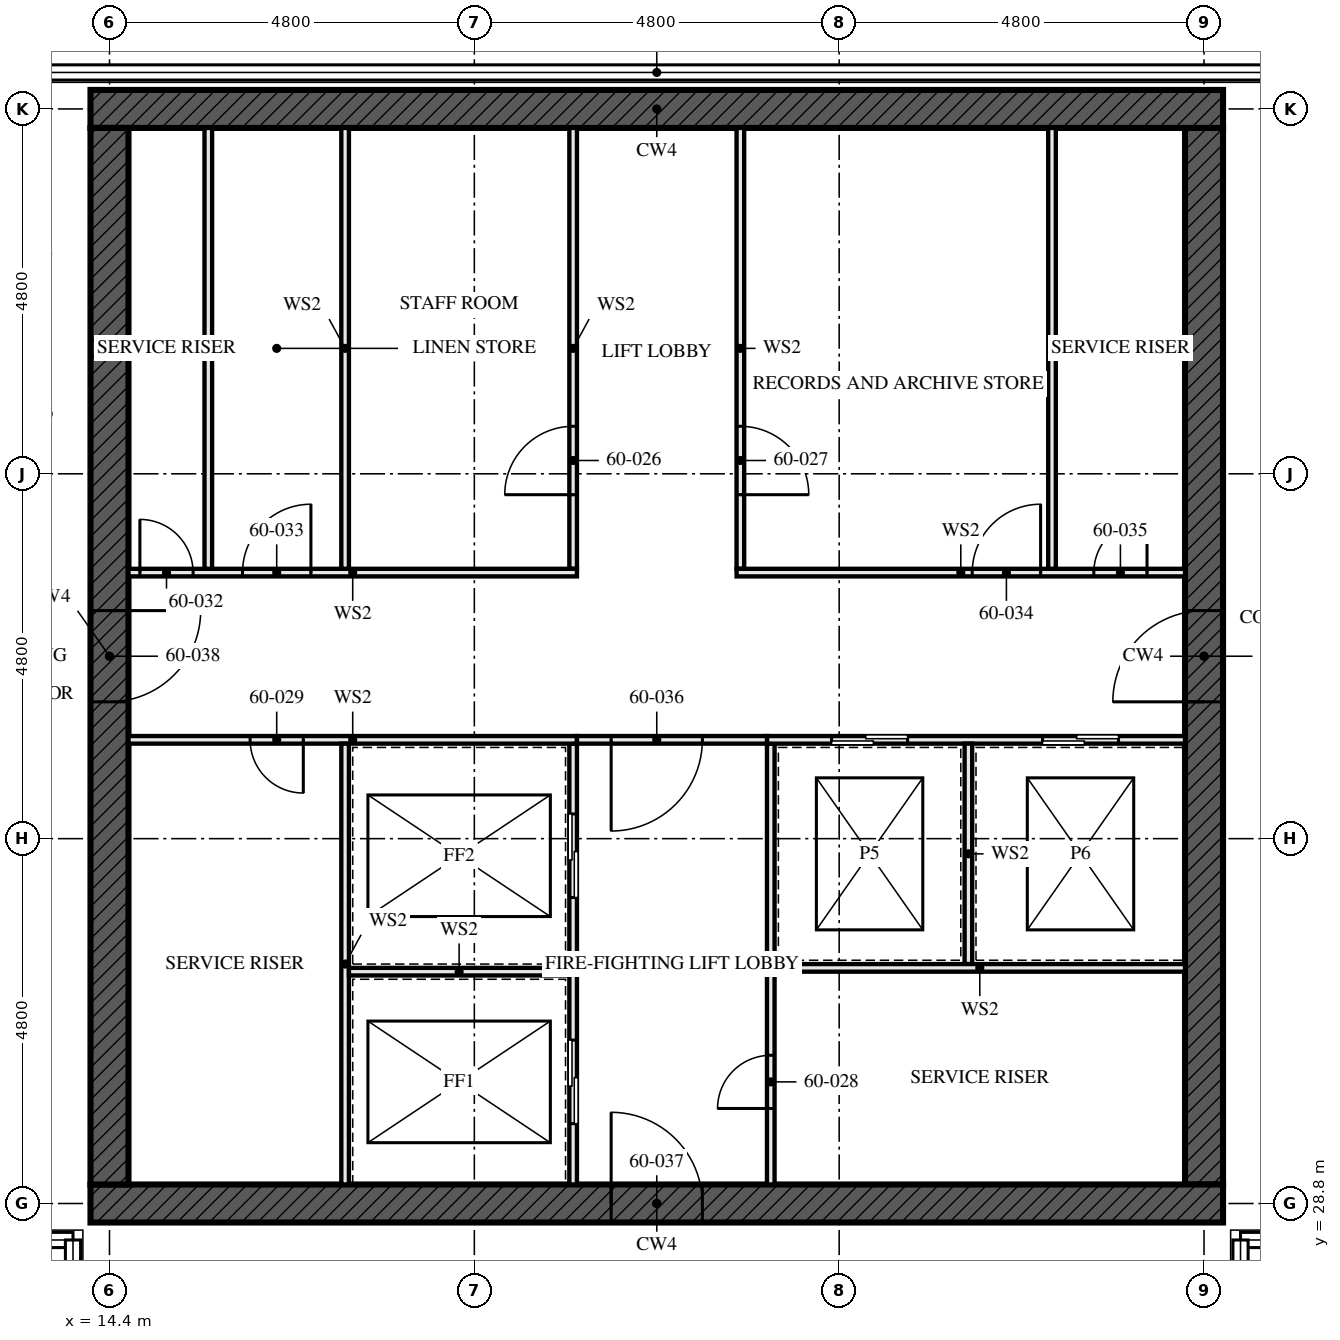
"""IFC4 building model, lengths in metres.
Left out: names, types, materials, properties, quantities, classifications, styles, units other than length and angle.
Written with IfcOpenShell. Run it as: python <this file> out.ifc"""

import sys

from ifc_helpers import new_model, si_unit, direction, frame, frame_2d, origin, place, context, subcontext, project, spatial, rectangle, extrude, element, fill, save


model = new_model("IFC4")
c1 = context("Model", 3, precision=1e-05, world=origin(), true_north=direction((0.0, 1.0)))
c2 = subcontext(c1, "Body", "Model", "MODEL_VIEW")
j1 = project(units=[si_unit("LENGTHUNIT", "METRE"), si_unit("PLANEANGLEUNIT", "RADIAN")], contexts=[c1])
p1 = place(None, origin())
s1 = spatial("IfcSite", under=j1, at=p1, CompositionType="ELEMENT")
p2 = place(p1, origin())
s2 = spatial("IfcBuilding", under=s1, at=p2, CompositionType="ELEMENT")
p3 = place(p2, frame((0.0, 0.0, 219.0)))
s3 = spatial("IfcBuildingStorey", under=s2, at=p3, CompositionType="ELEMENT", Elevation=219.0)
p4 = place(p3, frame((14.15, 28.8, -0.17), z_axis=(0.0, 0.0, 1.0), x_axis=(1.0, 0.0, 0.0)))
e1 = element("IfcWall", 1, at=p4, inside=s3, PredefinedType="SHEAR", context=c2, shape_type="SweptSolid", body=[
    extrude(rectangle(XDim=14.9, YDim=0.5, at=frame_2d((7.45, 0.0))), origin(), (0.0, 0.0, 1.0), 3.5),
])
p5 = place(p4, frame((6.85, 0.0, 0.17)))
e2 = element("IfcOpeningElement", 2, at=p5, cuts=e1, PredefinedType="OPENING", context=c2, shape_type="SweptSolid", body=[
    extrude(rectangle(XDim=1.2, YDim=2.1, at=frame_2d((0.6, 1.05))), frame((0.0, 0.26, 0.0), z_axis=(0.0, -1.0, 0.0), x_axis=(1.0, 0.0, 0.0)), (0.0, 0.0, 1.0), 0.521),
])
p6 = place(p3, frame((29.05, 43.2, -0.17), z_axis=(0.0, 0.0, 1.0), x_axis=(-1.0, 0.0, 0.0)))
e3 = element("IfcWall", 3, at=p6, inside=s3, PredefinedType="SHEAR", context=c2, shape_type="SweptSolid", body=[
    extrude(rectangle(XDim=14.9, YDim=0.5, at=frame_2d((7.45, 0.0))), origin(), (0.0, 0.0, 1.0), 3.5),
])
p7 = place(p3, frame((14.4, 42.95, -0.17), z_axis=(0.0, 0.0, 1.0), x_axis=(0.0, -1.0, 0.0)))
e4 = element("IfcWall", 4, at=p7, inside=s3, PredefinedType="SHEAR", context=c2, shape_type="SweptSolid", body=[
    extrude(rectangle(XDim=13.9, YDim=0.5, at=frame_2d((6.95, 0.0))), origin(), (0.0, 0.0, 1.0), 3.5),
])
p8 = place(p7, frame((6.35, 0.0, 0.17)))
e5 = element("IfcOpeningElement", 5, at=p8, cuts=e4, PredefinedType="OPENING", context=c2, shape_type="SweptSolid", body=[
    extrude(rectangle(XDim=1.2, YDim=2.1, at=frame_2d((0.6, 1.05))), frame((0.0, 0.26, 0.0), z_axis=(0.0, -1.0, 0.0), x_axis=(1.0, 0.0, 0.0)), (0.0, 0.0, 1.0), 0.521),
])
p9 = place(p3, frame((28.8, 29.05, -0.17), z_axis=(0.0, 0.0, 1.0), x_axis=(0.0, 1.0, 0.0)))
e6 = element("IfcWall", 6, at=p9, inside=s3, PredefinedType="SHEAR", context=c2, shape_type="SweptSolid", body=[
    extrude(rectangle(XDim=13.9, YDim=0.5, at=frame_2d((6.95, 0.0))), origin(), (0.0, 0.0, 1.0), 3.5),
])
p10 = place(p9, frame((6.35, 0.0, 0.17)))
e7 = element("IfcOpeningElement", 7, at=p10, cuts=e6, PredefinedType="OPENING", context=c2, shape_type="SweptSolid", body=[
    extrude(rectangle(XDim=1.2, YDim=2.1, at=frame_2d((0.6, 1.05))), frame((0.0, 0.26, 0.0), z_axis=(0.0, -1.0, 0.0), x_axis=(1.0, 0.0, 0.0)), (0.0, 0.0, 1.0), 0.521),
])
for number, where, z_axis, x_axis in (
    (8, (15.7, 37.15, 0.0), (0.0, 0.0, 1.0), (0.0, 1.0, 0.0)),
    (9, (26.8, 37.15, 0.0), (0.0, 0.0, 1.0), (0.0, 1.0, 0.0)),
):
    element("IfcWall", number, at=place(p3, frame(where, z_axis=z_axis, x_axis=x_axis)), inside=s3, PredefinedType="SOLIDWALL", context=c2, shape_type="SweptSolid", body=[
        extrude(rectangle(XDim=5.8, YDim=0.1, at=frame_2d((2.9, 0.0))), origin(), (0.0, 0.0, 1.0), 3.33),
    ])
p11 = place(p3, frame((20.5, 29.05, 0.0), z_axis=(0.0, 0.0, 1.0), x_axis=(0.0, 1.0, 0.0)))
e10 = element("IfcWall", 10, at=p11, inside=s3, PredefinedType="SOLIDWALL", context=c2, shape_type="SweptSolid", body=[
    extrude(rectangle(XDim=5.8, YDim=0.1, at=frame_2d((2.9, 0.0))), origin(), (0.0, 0.0, 1.0), 3.33),
])
p12 = place(p11, frame((0.8, 0.0, 0.0)))
e11 = element("IfcOpeningElement", 11, at=p12, cuts=e10, PredefinedType="OPENING", context=c2, shape_type="SweptSolid", body=[
    extrude(rectangle(XDim=1.1, YDim=2.3, at=frame_2d((0.55, 1.15))), frame((0.0, 0.061, 0.0), z_axis=(0.0, -1.0, 0.0), x_axis=(1.0, 0.0, 0.0)), (0.0, 0.0, 1.0), 0.121),
])
p13 = place(p11, frame((3.775, 0.0, 0.0)))
e12 = element("IfcOpeningElement", 12, at=p13, cuts=e10, PredefinedType="OPENING", context=c2, shape_type="SweptSolid", body=[
    extrude(rectangle(XDim=1.1, YDim=2.3, at=frame_2d((0.55, 1.15))), frame((0.0, 0.061, 0.0), z_axis=(0.0, -1.0, 0.0), x_axis=(1.0, 0.0, 0.0)), (0.0, 0.0, 1.0), 0.121),
])
p14 = place(p3, frame((20.5, 37.15, 0.0), z_axis=(0.0, 0.0, 1.0), x_axis=(0.0, 1.0, 0.0)))
e13 = element("IfcWall", 13, at=p14, inside=s3, PredefinedType="SOLIDWALL", context=c2, shape_type="SweptSolid", body=[
    extrude(rectangle(XDim=5.8, YDim=0.1, at=frame_2d((2.9, 0.0))), origin(), (0.0, 0.0, 1.0), 3.33),
])
p15 = place(p14, frame((0.975, 0.0, 0.0)))
e14 = element("IfcOpeningElement", 14, at=p15, cuts=e13, PredefinedType="OPENING", context=c2, shape_type="SweptSolid", body=[
    extrude(rectangle(XDim=0.9, YDim=2.1, at=frame_2d((0.45, 1.05))), frame((0.0, 0.061, 0.0), z_axis=(0.0, -1.0, 0.0), x_axis=(1.0, 0.0, 0.0)), (0.0, 0.0, 1.0), 0.121),
])
p16 = place(p3, frame((22.7, 37.15, 0.0), z_axis=(0.0, 0.0, 1.0), x_axis=(0.0, 1.0, 0.0)))
e15 = element("IfcWall", 15, at=p16, inside=s3, PredefinedType="SOLIDWALL", context=c2, shape_type="SweptSolid", body=[
    extrude(rectangle(XDim=5.8, YDim=0.1, at=frame_2d((2.9, 0.0))), origin(), (0.0, 0.0, 1.0), 3.33),
])
p17 = place(p16, frame((0.975, 0.0, 0.0)))
e16 = element("IfcOpeningElement", 16, at=p17, cuts=e15, PredefinedType="OPENING", context=c2, shape_type="SweptSolid", body=[
    extrude(rectangle(XDim=0.9, YDim=2.1, at=frame_2d((0.45, 1.05))), frame((0.0, 0.061, 0.0), z_axis=(0.0, -1.0, 0.0), x_axis=(1.0, 0.0, 0.0)), (0.0, 0.0, 1.0), 0.121),
])
p18 = place(p3, frame((23.1, 29.05, 0.0), z_axis=(0.0, 0.0, 1.0), x_axis=(0.0, 1.0, 0.0)))
e17 = element("IfcWall", 17, at=p18, inside=s3, PredefinedType="SOLIDWALL", context=c2, shape_type="SweptSolid", body=[
    extrude(rectangle(XDim=5.8, YDim=0.1, at=frame_2d((2.9, 0.0))), origin(), (0.0, 0.0, 1.0), 3.33),
])
p19 = place(p18, frame((1.0, 0.0, 0.0)))
e18 = element("IfcOpeningElement", 18, at=p19, cuts=e17, PredefinedType="OPENING", context=c2, shape_type="SweptSolid", body=[
    extrude(rectangle(XDim=0.7, YDim=2.1, at=frame_2d((0.35, 1.05))), frame((0.0, 0.061, 0.0), z_axis=(0.0, -1.0, 0.0), x_axis=(1.0, 0.0, 0.0)), (0.0, 0.0, 1.0), 0.121),
])
p20 = place(p3, frame((14.65, 34.9, 0.0), z_axis=(0.0, 0.0, 1.0), x_axis=(1.0, 0.0, 0.0)))
e19 = element("IfcWall", 19, at=p20, inside=s3, PredefinedType="SOLIDWALL", context=c2, shape_type="SweptSolid", body=[
    extrude(rectangle(XDim=5.9, YDim=0.1, at=frame_2d((2.95, 0.0))), origin(), (0.0, 0.0, 1.0), 3.33),
])
p21 = place(p20, frame((1.6, 0.0, 0.0)))
e20 = element("IfcOpeningElement", 20, at=p21, cuts=e19, PredefinedType="OPENING", context=c2, shape_type="SweptSolid", body=[
    extrude(rectangle(XDim=0.7, YDim=2.1, at=frame_2d((0.35, 1.05))), frame((0.0, 0.061, 0.0), z_axis=(0.0, -1.0, 0.0), x_axis=(1.0, 0.0, 0.0)), (0.0, 0.0, 1.0), 0.121),
])
p22 = place(p3, frame((23.05, 34.9, 0.0), z_axis=(0.0, 0.0, 1.0), x_axis=(1.0, 0.0, 0.0)))
e21 = element("IfcWall", 21, at=p22, inside=s3, PredefinedType="SOLIDWALL", context=c2, shape_type="SweptSolid", body=[
    extrude(rectangle(XDim=5.5, YDim=0.1, at=frame_2d((2.75, 0.0))), origin(), (0.0, 0.0, 1.0), 3.33),
])
p23 = place(p22, frame((0.85, 0.0, 0.0)))
e22 = element("IfcOpeningElement", 22, at=p23, cuts=e21, PredefinedType="OPENING", context=c2, shape_type="SweptSolid", body=[
    extrude(rectangle(XDim=1.0, YDim=2.1, at=frame_2d((0.5, 1.05))), frame((0.0, 0.061, 0.0), z_axis=(0.0, -1.0, 0.0), x_axis=(1.0, 0.0, 0.0)), (0.0, 0.0, 1.0), 0.121),
])
p24 = place(p22, frame((3.625, 0.0, 0.0)))
e23 = element("IfcOpeningElement", 23, at=p24, cuts=e21, PredefinedType="OPENING", context=c2, shape_type="SweptSolid", body=[
    extrude(rectangle(XDim=1.0, YDim=2.1, at=frame_2d((0.5, 1.05))), frame((0.0, 0.061, 0.0), z_axis=(0.0, -1.0, 0.0), x_axis=(1.0, 0.0, 0.0)), (0.0, 0.0, 1.0), 0.121),
])
p25 = place(p3, frame((14.65, 37.1, 0.0), z_axis=(0.0, 0.0, 1.0), x_axis=(1.0, 0.0, 0.0)))
e24 = element("IfcWall", 24, at=p25, inside=s3, PredefinedType="SOLIDWALL", context=c2, shape_type="SweptSolid", body=[
    extrude(rectangle(XDim=5.9, YDim=0.1, at=frame_2d((2.95, 0.0))), origin(), (0.0, 0.0, 1.0), 3.33),
])
p26 = place(p25, frame((0.15, 0.0, 0.0)))
e25 = element("IfcOpeningElement", 25, at=p26, cuts=e24, PredefinedType="OPENING", context=c2, shape_type="SweptSolid", body=[
    extrude(rectangle(XDim=0.7, YDim=2.1, at=frame_2d((0.35, 1.05))), frame((0.0, 0.061, 0.0), z_axis=(0.0, -1.0, 0.0), x_axis=(1.0, 0.0, 0.0)), (0.0, 0.0, 1.0), 0.121),
])
p27 = place(p25, frame((1.5, 0.0, 0.0)))
e26 = element("IfcOpeningElement", 26, at=p27, cuts=e24, PredefinedType="OPENING", context=c2, shape_type="SweptSolid", body=[
    extrude(rectangle(XDim=0.9, YDim=2.1, at=frame_2d((0.45, 1.05))), frame((0.0, 0.061, 0.0), z_axis=(0.0, -1.0, 0.0), x_axis=(1.0, 0.0, 0.0)), (0.0, 0.0, 1.0), 0.121),
])
p28 = place(p3, frame((22.65, 37.1, 0.0), z_axis=(0.0, 0.0, 1.0), x_axis=(1.0, 0.0, 0.0)))
e27 = element("IfcWall", 27, at=p28, inside=s3, PredefinedType="SOLIDWALL", context=c2, shape_type="SweptSolid", body=[
    extrude(rectangle(XDim=5.9, YDim=0.1, at=frame_2d((2.95, 0.0))), origin(), (0.0, 0.0, 1.0), 3.33),
])
p29 = place(p28, frame((3.1, 0.0, 0.0)))
e28 = element("IfcOpeningElement", 28, at=p29, cuts=e27, PredefinedType="OPENING", context=c2, shape_type="SweptSolid", body=[
    extrude(rectangle(XDim=0.9, YDim=2.1, at=frame_2d((0.45, 1.05))), frame((0.0, 0.061, 0.0), z_axis=(0.0, -1.0, 0.0), x_axis=(1.0, 0.0, 0.0)), (0.0, 0.0, 1.0), 0.121),
])
p30 = place(p28, frame((4.7, 0.0, 0.0)))
e29 = element("IfcOpeningElement", 29, at=p30, cuts=e27, PredefinedType="OPENING", context=c2, shape_type="SweptSolid", body=[
    extrude(rectangle(XDim=0.7, YDim=2.1, at=frame_2d((0.35, 1.05))), frame((0.0, 0.061, 0.0), z_axis=(0.0, -1.0, 0.0), x_axis=(1.0, 0.0, 0.0)), (0.0, 0.0, 1.0), 0.121),
])
p31 = place(p3, frame((20.55, 34.9, 0.0), z_axis=(0.0, 0.0, 1.0), x_axis=(1.0, 0.0, 0.0)))
e30 = element("IfcWall", 30, at=p31, inside=s3, PredefinedType="SOLIDWALL", context=c2, shape_type="SweptSolid", body=[
    extrude(rectangle(XDim=2.5, YDim=0.1, at=frame_2d((1.25, 0.0))), origin(), (0.0, 0.0, 1.0), 3.33),
])
p32 = place(p31, frame((0.45, 0.0, 0.0)))
e31 = element("IfcOpeningElement", 31, at=p32, cuts=e30, PredefinedType="OPENING", context=c2, shape_type="SweptSolid", body=[
    extrude(rectangle(XDim=1.2, YDim=2.1, at=frame_2d((0.6, 1.05))), frame((0.0, 0.061, 0.0), z_axis=(0.0, -1.0, 0.0), x_axis=(1.0, 0.0, 0.0)), (0.0, 0.0, 1.0), 0.121),
])
p33 = place(p3, frame((17.5, 29.05, 0.0), z_axis=(0.0, 0.0, 1.0), x_axis=(0.0, 1.0, 0.0)))
e32 = element("IfcWall", 32, at=p33, inside=s3, PredefinedType="SOLIDWALL", context=c2, shape_type="SweptSolid", body=[
    extrude(rectangle(XDim=5.8, YDim=0.1, at=frame_2d((2.9, 0.0))), origin(), (0.0, 0.0, 1.0), 3.33),
])
p34 = place(p3, frame((17.55, 31.85, 0.0), z_axis=(0.0, 0.0, 1.0), x_axis=(1.0, 0.0, 0.0)))
e33 = element("IfcWall", 33, at=p34, inside=s3, PredefinedType="SOLIDWALL", context=c2, shape_type="SweptSolid", body=[
    extrude(rectangle(XDim=2.9, YDim=0.1, at=frame_2d((1.45, 0.0))), origin(), (0.0, 0.0, 1.0), 3.33),
])
p35 = place(p3, frame((17.5, 37.15, 0.0), z_axis=(0.0, 0.0, 1.0), x_axis=(0.0, 1.0, 0.0)))
e34 = element("IfcWall", 34, at=p35, inside=s3, PredefinedType="SOLIDWALL", context=c2, shape_type="SweptSolid", body=[
    extrude(rectangle(XDim=5.8, YDim=0.1, at=frame_2d((2.9, 0.0))), origin(), (0.0, 0.0, 1.0), 3.33),
])
p36 = place(p3, frame((25.7, 31.95, 0.0), z_axis=(0.0, 0.0, 1.0), x_axis=(0.0, 1.0, 0.0)))
e35 = element("IfcWall", 35, at=p36, inside=s3, PredefinedType="SOLIDWALL", context=c2, shape_type="SweptSolid", body=[
    extrude(rectangle(XDim=2.9, YDim=0.1, at=frame_2d((1.45, 0.0))), origin(), (0.0, 0.0, 1.0), 3.33),
])
p37 = place(p3, frame((23.15, 31.9, 0.0), z_axis=(0.0, 0.0, 1.0), x_axis=(1.0, 0.0, 0.0)))
e36 = element("IfcWall", 36, at=p37, inside=s3, PredefinedType="SOLIDWALL", context=c2, shape_type="SweptSolid", body=[
    extrude(rectangle(XDim=5.4, YDim=0.1, at=frame_2d((2.7, 0.0))), origin(), (0.0, 0.0, 1.0), 3.33),
])
p38 = place(p12, origin())
e37 = element("IfcDoor", 37, at=p38, inside=s3, OperationType="SLIDING_TO_LEFT", PredefinedType="DOOR", context=c2, shape_type="SweptSolid", body=[
    extrude(rectangle(XDim=1.1, YDim=2.3, at=frame_2d((0.55, 1.15))), frame((0.0, 0.05, 0.0), z_axis=(0.0, -1.0, 0.0), x_axis=(1.0, 0.0, 0.0)), (0.0, 0.0, 1.0), 0.1),
])
fill(e11, e37)
p39 = place(p13, origin())
e38 = element("IfcDoor", 38, at=p39, inside=s3, OperationType="SLIDING_TO_LEFT", PredefinedType="DOOR", context=c2, shape_type="SweptSolid", body=[
    extrude(rectangle(XDim=1.1, YDim=2.3, at=frame_2d((0.55, 1.15))), frame((0.0, 0.05, 0.0), z_axis=(0.0, -1.0, 0.0), x_axis=(1.0, 0.0, 0.0)), (0.0, 0.0, 1.0), 0.1),
])
fill(e12, e38)
p40 = place(p15, origin())
e39 = element("IfcDoor", 39, at=p40, inside=s3, OperationType="SINGLE_SWING_RIGHT", PredefinedType="DOOR", context=c2, shape_type="SweptSolid", body=[
    extrude(rectangle(XDim=0.9, YDim=2.1, at=frame_2d((0.45, 1.05))), frame((0.0, 0.027, 0.0), z_axis=(0.0, -1.0, 0.0), x_axis=(1.0, 0.0, 0.0)), (0.0, 0.0, 1.0), 0.054),
])
fill(e14, e39)
p41 = place(p17, frame((0.9, 0.0, 0.0), z_axis=(0.0, 0.0, 1.0), x_axis=(-1.0, 0.0, 0.0)))
e40 = element("IfcDoor", 40, at=p41, inside=s3, OperationType="SINGLE_SWING_LEFT", PredefinedType="DOOR", context=c2, shape_type="SweptSolid", body=[
    extrude(rectangle(XDim=0.9, YDim=2.1, at=frame_2d((0.45, 1.05))), frame((0.0, 0.027, 0.0), z_axis=(0.0, -1.0, 0.0), x_axis=(1.0, 0.0, 0.0)), (0.0, 0.0, 1.0), 0.054),
])
fill(e16, e40)
p42 = place(p19, origin())
e41 = element("IfcDoor", 41, at=p42, inside=s3, OperationType="SINGLE_SWING_RIGHT", PredefinedType="DOOR", context=c2, shape_type="SweptSolid", body=[
    extrude(rectangle(XDim=0.7, YDim=2.1, at=frame_2d((0.35, 1.05))), frame((0.0, 0.027, 0.0), z_axis=(0.0, -1.0, 0.0), x_axis=(1.0, 0.0, 0.0)), (0.0, 0.0, 1.0), 0.054),
])
fill(e18, e41)
p43 = place(p21, frame((0.7, 0.0, 0.0), z_axis=(0.0, 0.0, 1.0), x_axis=(-1.0, 0.0, 0.0)))
e42 = element("IfcDoor", 42, at=p43, inside=s3, OperationType="SINGLE_SWING_RIGHT", PredefinedType="DOOR", context=c2, shape_type="SweptSolid", body=[
    extrude(rectangle(XDim=0.7, YDim=2.1, at=frame_2d((0.35, 1.05))), frame((0.0, 0.027, 0.0), z_axis=(0.0, -1.0, 0.0), x_axis=(1.0, 0.0, 0.0)), (0.0, 0.0, 1.0), 0.054),
])
fill(e20, e42)
p44 = place(p23, origin())
e43 = element("IfcDoor", 43, at=p44, inside=s3, OperationType="SLIDING_TO_LEFT", PredefinedType="DOOR", context=c2, shape_type="SweptSolid", body=[
    extrude(rectangle(XDim=1.0, YDim=2.1, at=frame_2d((0.5, 1.05))), frame((0.0, 0.05, 0.0), z_axis=(0.0, -1.0, 0.0), x_axis=(1.0, 0.0, 0.0)), (0.0, 0.0, 1.0), 0.1),
])
fill(e22, e43)
p45 = place(p24, origin())
e44 = element("IfcDoor", 44, at=p45, inside=s3, OperationType="SLIDING_TO_LEFT", PredefinedType="DOOR", context=c2, shape_type="SweptSolid", body=[
    extrude(rectangle(XDim=1.0, YDim=2.1, at=frame_2d((0.5, 1.05))), frame((0.0, 0.05, 0.0), z_axis=(0.0, -1.0, 0.0), x_axis=(1.0, 0.0, 0.0)), (0.0, 0.0, 1.0), 0.1),
])
fill(e23, e44)
p46 = place(p26, origin())
e45 = element("IfcDoor", 45, at=p46, inside=s3, OperationType="SINGLE_SWING_RIGHT", PredefinedType="DOOR", context=c2, shape_type="SweptSolid", body=[
    extrude(rectangle(XDim=0.7, YDim=2.1, at=frame_2d((0.35, 1.05))), frame((0.0, 0.027, 0.0), z_axis=(0.0, -1.0, 0.0), x_axis=(1.0, 0.0, 0.0)), (0.0, 0.0, 1.0), 0.054),
])
fill(e25, e45)
p47 = place(p27, origin())
e46 = element("IfcDoor", 46, at=p47, inside=s3, OperationType="SINGLE_SWING_LEFT", PredefinedType="DOOR", context=c2, shape_type="SweptSolid", body=[
    extrude(rectangle(XDim=0.9, YDim=2.1, at=frame_2d((0.45, 1.05))), frame((0.0, 0.027, 0.0), z_axis=(0.0, -1.0, 0.0), x_axis=(1.0, 0.0, 0.0)), (0.0, 0.0, 1.0), 0.054),
])
fill(e26, e46)
p48 = place(p29, origin())
e47 = element("IfcDoor", 47, at=p48, inside=s3, OperationType="SINGLE_SWING_LEFT", PredefinedType="DOOR", context=c2, shape_type="SweptSolid", body=[
    extrude(rectangle(XDim=0.9, YDim=2.1, at=frame_2d((0.45, 1.05))), frame((0.0, 0.027, 0.0), z_axis=(0.0, -1.0, 0.0), x_axis=(1.0, 0.0, 0.0)), (0.0, 0.0, 1.0), 0.054),
])
fill(e28, e47)
p49 = place(p30, origin())
e48 = element("IfcDoor", 48, at=p49, inside=s3, OperationType="SINGLE_SWING_LEFT", PredefinedType="DOOR", context=c2, shape_type="SweptSolid", body=[
    extrude(rectangle(XDim=0.7, YDim=2.1, at=frame_2d((0.35, 1.05))), frame((0.0, 0.027, 0.0), z_axis=(0.0, -1.0, 0.0), x_axis=(1.0, 0.0, 0.0)), (0.0, 0.0, 1.0), 0.054),
])
fill(e29, e48)
p50 = place(p32, frame((1.2, 0.0, 0.0), z_axis=(0.0, 0.0, 1.0), x_axis=(-1.0, 0.0, 0.0)))
e49 = element("IfcDoor", 49, at=p50, inside=s3, OperationType="SINGLE_SWING_LEFT", PredefinedType="DOOR", context=c2, shape_type="SweptSolid", body=[
    extrude(rectangle(XDim=1.2, YDim=2.1, at=frame_2d((0.6, 1.05))), frame((0.0, 0.027, 0.0), z_axis=(0.0, -1.0, 0.0), x_axis=(1.0, 0.0, 0.0)), (0.0, 0.0, 1.0), 0.054),
])
fill(e31, e49)
p51 = place(p5, origin())
e50 = element("IfcDoor", 50, at=p51, inside=s3, OperationType="SINGLE_SWING_LEFT", PredefinedType="DOOR", context=c2, shape_type="SweptSolid", body=[
    extrude(rectangle(XDim=1.2, YDim=2.1, at=frame_2d((0.6, 1.05))), frame((0.0, 0.027, 0.0), z_axis=(0.0, -1.0, 0.0), x_axis=(1.0, 0.0, 0.0)), (0.0, 0.0, 1.0), 0.054),
])
fill(e2, e50)
p52 = place(p8, origin())
e51 = element("IfcDoor", 51, at=p52, inside=s3, OperationType="SINGLE_SWING_LEFT", PredefinedType="DOOR", context=c2, shape_type="SweptSolid", body=[
    extrude(rectangle(XDim=1.2, YDim=2.1, at=frame_2d((0.6, 1.05))), frame((0.0, 0.027, 0.0), z_axis=(0.0, -1.0, 0.0), x_axis=(1.0, 0.0, 0.0)), (0.0, 0.0, 1.0), 0.054),
])
fill(e5, e51)
p53 = place(p10, origin())
e52 = element("IfcDoor", 52, at=p53, inside=s3, OperationType="SINGLE_SWING_LEFT", PredefinedType="DOOR", context=c2, shape_type="SweptSolid", body=[
    extrude(rectangle(XDim=1.2, YDim=2.1, at=frame_2d((0.6, 1.05))), frame((0.0, 0.027, 0.0), z_axis=(0.0, -1.0, 0.0), x_axis=(1.0, 0.0, 0.0)), (0.0, 0.0, 1.0), 0.054),
])
fill(e7, e52)
save(model, sys.argv[1])
